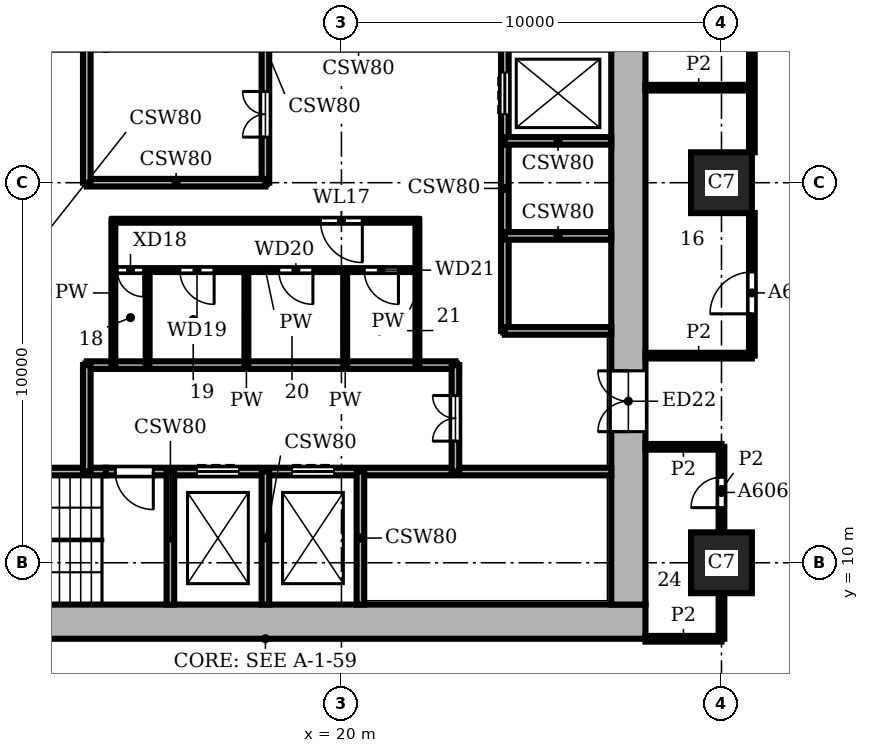
"""IFC4 building model, lengths in metres.
Left out: names, types, materials, properties, quantities, classifications, styles, units other than length and angle.
Written with IfcOpenShell. Run it as: python <this file> out.ifc"""

import sys

from ifc_helpers import new_model, si_unit, direction, frame, frame_2d, origin, origin_2d, place, context, subcontext, project, spatial, rectangle, extrude, element, fill, save


model = new_model("IFC4")
c1 = context("Model", 3, precision=1e-05, world=origin(), true_north=direction((0.0, 1.0)))
c2 = subcontext(c1, "Body", "Model", "MODEL_VIEW")
j1 = project(units=[si_unit("LENGTHUNIT", "METRE"), si_unit("PLANEANGLEUNIT", "RADIAN")], contexts=[c1])
p1 = place(None, origin())
s1 = spatial("IfcSite", under=j1, at=p1, CompositionType="ELEMENT")
p2 = place(p1, origin())
s2 = spatial("IfcBuilding", under=s1, at=p2, CompositionType="ELEMENT")
p3 = place(p2, frame((0.0, 0.0, 70.5)))
s3 = spatial("IfcBuildingStorey", under=s2, at=p3, CompositionType="ELEMENT", Elevation=70.5)
for number, where, z_axis, x_axis in (
    (1, (30.0, 10.0, 0.0), (0.0, 0.0, 1.0), (1.0, 0.0, 0.0)),
    (2, (30.0, 20.0, 0.0), (0.0, 0.0, 1.0), (1.0, 0.0, 0.0)),
):
    element("IfcColumn", number, at=place(p3, frame(where, z_axis=z_axis, x_axis=x_axis)), inside=s3, PredefinedType="COLUMN", context=c2, shape_type="SweptSolid", body=[
        extrude(rectangle(XDim=1.6, YDim=1.6, at=origin_2d()), origin(), (0.0, 0.0, 1.0), 3.9),
    ])
p4 = place(p3, frame((8.0, 8.45, 0.0), z_axis=(0.0, 0.0, 1.0), x_axis=(1.0, 0.0, 0.0)))
e3 = element("IfcWall", 3, at=p4, inside=s3, PredefinedType="SHEAR", context=c2, shape_type="SweptSolid", body=[
    extrude(rectangle(XDim=20.0, YDim=0.9, at=frame_2d((10.0, 0.0))), origin(), (0.0, 0.0, 1.0), 3.9),
])
p5 = place(p3, frame((27.55, 8.9, 0.0), z_axis=(0.0, 0.0, 1.0), x_axis=(0.0, 1.0, 0.0)))
e4 = element("IfcWall", 4, at=p5, inside=s3, PredefinedType="SHEAR", context=c2, shape_type="SweptSolid", body=[
    extrude(rectangle(XDim=18.2, YDim=0.9, at=frame_2d((9.1, 0.0))), origin(), (0.0, 0.0, 1.0), 3.9),
])
p6 = place(p5, frame((4.55, 0.0, 0.0)))
e5 = element("IfcOpeningElement", 5, at=p6, cuts=e4, PredefinedType="OPENING", context=c2, shape_type="SweptSolid", body=[
    extrude(rectangle(XDim=1.6, YDim=2.1, at=frame_2d((0.8, 1.05))), frame((0.0, 0.46, 0.0), z_axis=(0.0, -1.0, 0.0), x_axis=(1.0, 0.0, 0.0)), (0.0, 0.0, 1.0), 0.92),
])
p7 = place(p3, frame((8.9, 12.4, 0.0), z_axis=(0.0, 0.0, 1.0), x_axis=(1.0, 0.0, 0.0)))
e6 = element("IfcWall", 6, at=p7, inside=s3, PredefinedType="SHEAR", context=c2, shape_type="SweptSolid", body=[
    extrude(rectangle(XDim=4.9, YDim=0.2, at=frame_2d((2.45, 0.0))), origin(), (0.0, 0.0, 1.0), 3.58),
])
p8 = place(p3, frame((13.8, 12.4, 0.0), z_axis=(0.0, 0.0, 1.0), x_axis=(1.0, 0.0, 0.0)))
e7 = element("IfcWall", 7, at=p8, inside=s3, PredefinedType="SHEAR", context=c2, shape_type="SweptSolid", body=[
    extrude(rectangle(XDim=13.3, YDim=0.2, at=frame_2d((6.65, 0.0))), origin(), (0.0, 0.0, 1.0), 3.58),
])
p9 = place(p8, frame((2.4, 0.0, 0.0)))
e8 = element("IfcOpeningElement", 8, at=p9, cuts=e7, PredefinedType="OPENING", context=c2, shape_type="SweptSolid", body=[
    extrude(rectangle(XDim=1.1, YDim=2.1, at=frame_2d((0.55, 1.05))), frame((0.0, 0.11, 0.0), z_axis=(0.0, -1.0, 0.0), x_axis=(1.0, 0.0, 0.0)), (0.0, 0.0, 1.0), 0.22),
])
p10 = place(p8, frame((4.9, 0.0, 0.0)))
e9 = element("IfcOpeningElement", 9, at=p10, cuts=e7, PredefinedType="OPENING", context=c2, shape_type="SweptSolid", body=[
    extrude(rectangle(XDim=1.1, YDim=2.1, at=frame_2d((0.55, 1.05))), frame((0.0, 0.11, 0.0), z_axis=(0.0, -1.0, 0.0), x_axis=(1.0, 0.0, 0.0)), (0.0, 0.0, 1.0), 0.22),
])
p11 = place(p8, frame((0.25, 0.0, 0.0)))
e10 = element("IfcOpeningElement", 10, at=p11, cuts=e7, PredefinedType="OPENING", context=c2, shape_type="SweptSolid", body=[
    extrude(rectangle(XDim=1.0, YDim=2.1, at=frame_2d((0.5, 1.05))), frame((0.0, 0.11, 0.0), z_axis=(0.0, -1.0, 0.0), x_axis=(1.0, 0.0, 0.0)), (0.0, 0.0, 1.0), 0.22),
])
p12 = place(p3, frame((13.3, 15.2, 0.0), z_axis=(0.0, 0.0, 1.0), x_axis=(1.0, 0.0, 0.0)))
e11 = element("IfcWall", 11, at=p12, inside=s3, PredefinedType="SHEAR", context=c2, shape_type="SweptSolid", body=[
    extrude(rectangle(XDim=9.7, YDim=0.2, at=frame_2d((4.85, 0.0))), origin(), (0.0, 0.0, 1.0), 3.58),
])
p13 = place(p3, frame((24.3, 16.1, 0.0), z_axis=(0.0, 0.0, 1.0), x_axis=(1.0, 0.0, 0.0)))
e12 = element("IfcWall", 12, at=p13, inside=s3, PredefinedType="SHEAR", context=c2, shape_type="SweptSolid", body=[
    extrude(rectangle(XDim=2.8, YDim=0.2, at=frame_2d((1.4, 0.0))), origin(), (0.0, 0.0, 1.0), 3.58),
])
p14 = place(p3, frame((14.0, 17.7, 0.0), z_axis=(0.0, 0.0, 1.0), x_axis=(1.0, 0.0, 0.0)))
e13 = element("IfcWall", 13, at=p14, inside=s3, PredefinedType="PARTITIONING", context=c2, shape_type="SweptSolid", body=[
    extrude(rectangle(XDim=8.0, YDim=0.1, at=frame_2d((4.0, 0.0))), origin(), (0.0, 0.0, 1.0), 3.58),
])
p15 = place(p14, frame((0.1, 0.0, 0.0)))
e14 = element("IfcOpeningElement", 14, at=p15, cuts=e13, PredefinedType="OPENING", context=c2, shape_type="SweptSolid", body=[
    extrude(rectangle(XDim=0.7, YDim=2.1, at=frame_2d((0.35, 1.05))), frame((0.0, 0.06, 0.0), z_axis=(0.0, -1.0, 0.0), x_axis=(1.0, 0.0, 0.0)), (0.0, 0.0, 1.0), 0.12),
])
p16 = place(p14, frame((1.75, 0.0, 0.0)))
e15 = element("IfcOpeningElement", 15, at=p16, cuts=e13, PredefinedType="OPENING", context=c2, shape_type="SweptSolid", body=[
    extrude(rectangle(XDim=0.9, YDim=2.1, at=frame_2d((0.45, 1.05))), frame((0.0, 0.06, 0.0), z_axis=(0.0, -1.0, 0.0), x_axis=(1.0, 0.0, 0.0)), (0.0, 0.0, 1.0), 0.12),
])
p17 = place(p14, frame((4.35, 0.0, 0.0)))
e16 = element("IfcOpeningElement", 16, at=p17, cuts=e13, PredefinedType="OPENING", context=c2, shape_type="SweptSolid", body=[
    extrude(rectangle(XDim=0.9, YDim=2.1, at=frame_2d((0.45, 1.05))), frame((0.0, 0.06, 0.0), z_axis=(0.0, -1.0, 0.0), x_axis=(1.0, 0.0, 0.0)), (0.0, 0.0, 1.0), 0.12),
])
p18 = place(p14, frame((6.6, 0.0, 0.0)))
e17 = element("IfcOpeningElement", 17, at=p18, cuts=e13, PredefinedType="OPENING", context=c2, shape_type="SweptSolid", body=[
    extrude(rectangle(XDim=0.9, YDim=2.1, at=frame_2d((0.45, 1.05))), frame((0.0, 0.06, 0.0), z_axis=(0.0, -1.0, 0.0), x_axis=(1.0, 0.0, 0.0)), (0.0, 0.0, 1.0), 0.12),
])
p19 = place(p3, frame((24.3, 18.6, 0.0), z_axis=(0.0, 0.0, 1.0), x_axis=(1.0, 0.0, 0.0)))
e18 = element("IfcWall", 18, at=p19, inside=s3, PredefinedType="SHEAR", context=c2, shape_type="SweptSolid", body=[
    extrude(rectangle(XDim=2.8, YDim=0.2, at=frame_2d((1.4, 0.0))), origin(), (0.0, 0.0, 1.0), 3.58),
])
p20 = place(p3, frame((14.0, 19.0, 0.0), z_axis=(0.0, 0.0, 1.0), x_axis=(1.0, 0.0, 0.0)))
e19 = element("IfcWall", 19, at=p20, inside=s3, PredefinedType="PARTITIONING", context=c2, shape_type="SweptSolid", body=[
    extrude(rectangle(XDim=8.0, YDim=0.1, at=frame_2d((4.0, 0.0))), origin(), (0.0, 0.0, 1.0), 3.58),
])
p21 = place(p20, frame((5.45, 0.0, 0.0)))
e20 = element("IfcOpeningElement", 20, at=p21, cuts=e19, PredefinedType="OPENING", context=c2, shape_type="SweptSolid", body=[
    extrude(rectangle(XDim=1.1, YDim=2.1, at=frame_2d((0.55, 1.05))), frame((0.0, 0.06, 0.0), z_axis=(0.0, -1.0, 0.0), x_axis=(1.0, 0.0, 0.0)), (0.0, 0.0, 1.0), 0.12),
])
p22 = place(p3, frame((13.3, 20.0, 0.0), z_axis=(0.0, 0.0, 1.0), x_axis=(1.0, 0.0, 0.0)))
e21 = element("IfcWall", 21, at=p22, inside=s3, PredefinedType="SHEAR", context=c2, shape_type="SweptSolid", body=[
    extrude(rectangle(XDim=4.7, YDim=0.2, at=frame_2d((2.35, 0.0))), origin(), (0.0, 0.0, 1.0), 3.58),
])
for number, where, z_axis, x_axis in (
    (22, (24.3, 21.1, 0.0), (0.0, 0.0, 1.0), (1.0, 0.0, 0.0)),
    (23, (13.3, 12.4, 0.0), (0.0, 0.0, 1.0), (0.0, 1.0, 0.0)),
):
    element("IfcWall", number, at=place(p3, frame(where, z_axis=z_axis, x_axis=x_axis)), inside=s3, PredefinedType="SHEAR", context=c2, shape_type="SweptSolid", body=[
        extrude(rectangle(XDim=2.8, YDim=0.2, at=frame_2d((1.4, 0.0))), origin(), (0.0, 0.0, 1.0), 3.58),
    ])
p23 = place(p3, frame((13.3, 20.0, 0.0), z_axis=(0.0, 0.0, 1.0), x_axis=(0.0, 1.0, 0.0)))
e24 = element("IfcWall", 24, at=p23, inside=s3, PredefinedType="SHEAR", context=c2, shape_type="SweptSolid", body=[
    extrude(rectangle(XDim=3.6, YDim=0.2, at=frame_2d((1.8, 0.0))), origin(), (0.0, 0.0, 1.0), 3.58),
])
p24 = place(p3, frame((14.0, 15.2, 0.0), z_axis=(0.0, 0.0, 1.0), x_axis=(0.0, 1.0, 0.0)))
e25 = element("IfcWall", 25, at=p24, inside=s3, PredefinedType="PARTITIONING", context=c2, shape_type="SweptSolid", body=[
    extrude(rectangle(XDim=3.8, YDim=0.1, at=frame_2d((1.9, 0.0))), origin(), (0.0, 0.0, 1.0), 3.58),
])
p25 = place(p3, frame((14.9, 15.2, 0.0), z_axis=(0.0, 0.0, 1.0), x_axis=(0.0, 1.0, 0.0)))
e26 = element("IfcWall", 26, at=p25, inside=s3, PredefinedType="PARTITIONING", context=c2, shape_type="SweptSolid", body=[
    extrude(rectangle(XDim=2.5, YDim=0.1, at=frame_2d((1.25, 0.0))), origin(), (0.0, 0.0, 1.0), 3.58),
])
p26 = place(p3, frame((15.5, 8.9, 0.0), z_axis=(0.0, 0.0, 1.0), x_axis=(0.0, 1.0, 0.0)))
e27 = element("IfcWall", 27, at=p26, inside=s3, PredefinedType="SHEAR", context=c2, shape_type="SweptSolid", body=[
    extrude(rectangle(XDim=3.5, YDim=0.2, at=frame_2d((1.75, 0.0))), origin(), (0.0, 0.0, 1.0), 3.58),
])
p27 = place(p3, frame((17.5, 15.2, 0.0), z_axis=(0.0, 0.0, 1.0), x_axis=(0.0, 1.0, 0.0)))
e28 = element("IfcWall", 28, at=p27, inside=s3, PredefinedType="PARTITIONING", context=c2, shape_type="SweptSolid", body=[
    extrude(rectangle(XDim=2.5, YDim=0.1, at=frame_2d((1.25, 0.0))), origin(), (0.0, 0.0, 1.0), 3.58),
])
p28 = place(p3, frame((18.0, 8.9, 0.0), z_axis=(0.0, 0.0, 1.0), x_axis=(0.0, 1.0, 0.0)))
e29 = element("IfcWall", 29, at=p28, inside=s3, PredefinedType="SHEAR", context=c2, shape_type="SweptSolid", body=[
    extrude(rectangle(XDim=3.5, YDim=0.2, at=frame_2d((1.75, 0.0))), origin(), (0.0, 0.0, 1.0), 3.58),
])
p29 = place(p3, frame((18.0, 20.0, 0.0), z_axis=(0.0, 0.0, 1.0), x_axis=(0.0, 1.0, 0.0)))
e30 = element("IfcWall", 30, at=p29, inside=s3, PredefinedType="SHEAR", context=c2, shape_type="SweptSolid", body=[
    extrude(rectangle(XDim=7.1, YDim=0.2, at=frame_2d((3.55, 0.0))), origin(), (0.0, 0.0, 1.0), 3.58),
])
p30 = place(p29, frame((1.2, 0.0, 0.0)))
e31 = element("IfcOpeningElement", 31, at=p30, cuts=e30, PredefinedType="OPENING", context=c2, shape_type="SweptSolid", body=[
    extrude(rectangle(XDim=1.2, YDim=2.1, at=frame_2d((0.6, 1.05))), frame((0.0, 0.11, 0.0), z_axis=(0.0, -1.0, 0.0), x_axis=(1.0, 0.0, 0.0)), (0.0, 0.0, 1.0), 0.22),
])
p31 = place(p3, frame((20.1, 15.2, 0.0), z_axis=(0.0, 0.0, 1.0), x_axis=(0.0, 1.0, 0.0)))
e32 = element("IfcWall", 32, at=p31, inside=s3, PredefinedType="PARTITIONING", context=c2, shape_type="SweptSolid", body=[
    extrude(rectangle(XDim=2.5, YDim=0.1, at=frame_2d((1.25, 0.0))), origin(), (0.0, 0.0, 1.0), 3.58),
])
p32 = place(p3, frame((20.5, 8.9, 0.0), z_axis=(0.0, 0.0, 1.0), x_axis=(0.0, 1.0, 0.0)))
e33 = element("IfcWall", 33, at=p32, inside=s3, PredefinedType="SHEAR", context=c2, shape_type="SweptSolid", body=[
    extrude(rectangle(XDim=3.5, YDim=0.2, at=frame_2d((1.75, 0.0))), origin(), (0.0, 0.0, 1.0), 3.58),
])
p33 = place(p3, frame((22.0, 15.2, 0.0), z_axis=(0.0, 0.0, 1.0), x_axis=(0.0, 1.0, 0.0)))
e34 = element("IfcWall", 34, at=p33, inside=s3, PredefinedType="PARTITIONING", context=c2, shape_type="SweptSolid", body=[
    extrude(rectangle(XDim=3.8, YDim=0.1, at=frame_2d((1.9, 0.0))), origin(), (0.0, 0.0, 1.0), 3.58),
])
p34 = place(p3, frame((23.0, 12.4, 0.0), z_axis=(0.0, 0.0, 1.0), x_axis=(0.0, 1.0, 0.0)))
e35 = element("IfcWall", 35, at=p34, inside=s3, PredefinedType="SHEAR", context=c2, shape_type="SweptSolid", body=[
    extrude(rectangle(XDim=2.8, YDim=0.2, at=frame_2d((1.4, 0.0))), origin(), (0.0, 0.0, 1.0), 3.58),
])
p35 = place(p34, frame((0.8, 0.0, 0.0)))
e36 = element("IfcOpeningElement", 36, at=p35, cuts=e35, PredefinedType="OPENING", context=c2, shape_type="SweptSolid", body=[
    extrude(rectangle(XDim=1.2, YDim=2.1, at=frame_2d((0.6, 1.05))), frame((0.0, 0.11, 0.0), z_axis=(0.0, -1.0, 0.0), x_axis=(1.0, 0.0, 0.0)), (0.0, 0.0, 1.0), 0.22),
])
p36 = place(p3, frame((24.3, 16.1, 0.0), z_axis=(0.0, 0.0, 1.0), x_axis=(0.0, 1.0, 0.0)))
e37 = element("IfcWall", 37, at=p36, inside=s3, PredefinedType="SHEAR", context=c2, shape_type="SweptSolid", body=[
    extrude(rectangle(XDim=7.5, YDim=0.2, at=frame_2d((3.75, 0.0))), origin(), (0.0, 0.0, 1.0), 3.58),
])
p37 = place(p36, frame((5.7, 0.0, 0.0)))
e38 = element("IfcOpeningElement", 38, at=p37, cuts=e37, PredefinedType="OPENING", context=c2, shape_type="SweptSolid", body=[
    extrude(rectangle(XDim=1.1, YDim=2.1, at=frame_2d((0.55, 1.05))), frame((0.0, 0.11, 0.0), z_axis=(0.0, -1.0, 0.0), x_axis=(1.0, 0.0, 0.0)), (0.0, 0.0, 1.0), 0.22),
])
p38 = place(p3, frame((30.0, 8.0, 0.0), z_axis=(0.0, 0.0, 1.0), x_axis=(0.0, 1.0, 0.0)))
e39 = element("IfcWall", 39, at=p38, inside=s3, PredefinedType="PARTITIONING", context=c2, shape_type="SweptSolid", body=[
    extrude(rectangle(XDim=1.2, YDim=0.15, at=frame_2d((0.6, 0.0))), origin(), (0.0, 0.0, 1.0), 3.58),
])
p39 = place(p3, frame((30.0, 10.8, 0.0), z_axis=(0.0, 0.0, 1.0), x_axis=(0.0, 1.0, 0.0)))
e40 = element("IfcWall", 40, at=p39, inside=s3, PredefinedType="PARTITIONING", context=c2, shape_type="SweptSolid", body=[
    extrude(rectangle(XDim=2.25, YDim=0.15, at=frame_2d((1.125, 0.0))), origin(), (0.0, 0.0, 1.0), 3.58),
])
p40 = place(p39, frame((0.65, 0.0, 0.0)))
e41 = element("IfcOpeningElement", 41, at=p40, cuts=e40, PredefinedType="OPENING", context=c2, shape_type="SweptSolid", body=[
    extrude(rectangle(XDim=0.8, YDim=2.1, at=frame_2d((0.4, 1.05))), frame((0.0, 0.085, 0.0), z_axis=(0.0, -1.0, 0.0), x_axis=(1.0, 0.0, 0.0)), (0.0, 0.0, 1.0), 0.17),
])
p41 = place(p3, frame((30.8, 15.45, 0.0), z_axis=(0.0, 0.0, 1.0), x_axis=(0.0, 1.0, 0.0)))
e42 = element("IfcWall", 42, at=p41, inside=s3, PredefinedType="PARTITIONING", context=c2, shape_type="SweptSolid", body=[
    extrude(rectangle(XDim=3.75, YDim=0.15, at=frame_2d((1.875, 0.0))), origin(), (0.0, 0.0, 1.0), 3.58),
])
p42 = place(p41, frame((1.1, 0.0, 0.0)))
e43 = element("IfcOpeningElement", 43, at=p42, cuts=e42, PredefinedType="OPENING", context=c2, shape_type="SweptSolid", body=[
    extrude(rectangle(XDim=1.1, YDim=2.1, at=frame_2d((0.55, 1.05))), frame((0.0, 0.085, 0.0), z_axis=(0.0, -1.0, 0.0), x_axis=(1.0, 0.0, 0.0)), (0.0, 0.0, 1.0), 0.17),
])
p43 = place(p3, frame((30.8, 20.8, 0.0), z_axis=(0.0, 0.0, 1.0), x_axis=(0.0, 1.0, 0.0)))
e44 = element("IfcWall", 44, at=p43, inside=s3, PredefinedType="PARTITIONING", context=c2, shape_type="SweptSolid", body=[
    extrude(rectangle(XDim=8.4, YDim=0.15, at=frame_2d((4.2, 0.0))), origin(), (0.0, 0.0, 1.0), 3.58),
])
p44 = place(p43, frame((4.3, 0.0, 0.0)))
e45 = element("IfcOpeningElement", 45, at=p44, cuts=e44, PredefinedType="OPENING", context=c2, shape_type="SweptSolid", body=[
    extrude(rectangle(XDim=0.8, YDim=2.1, at=frame_2d((0.4, 1.05))), frame((0.0, 0.085, 0.0), z_axis=(0.0, -1.0, 0.0), x_axis=(1.0, 0.0, 0.0)), (0.0, 0.0, 1.0), 0.17),
])
for number, where, z_axis, x_axis in (
    (46, (28.0, 8.0, 0.0), (0.0, 0.0, 1.0), (1.0, 0.0, 0.0)),
    (47, (28.0, 13.05, 0.0), (0.0, 0.0, 1.0), (1.0, 0.0, 0.0)),
):
    element("IfcWall", number, at=place(p3, frame(where, z_axis=z_axis, x_axis=x_axis)), inside=s3, PredefinedType="PARTITIONING", context=c2, shape_type="SweptSolid", body=[
        extrude(rectangle(XDim=2.0, YDim=0.15, at=frame_2d((1.0, 0.0))), origin(), (0.0, 0.0, 1.0), 3.58),
    ])
for number, where, z_axis, x_axis in (
    (48, (28.0, 15.45, 0.0), (0.0, 0.0, 1.0), (1.0, 0.0, 0.0)),
    (49, (28.0, 22.5, 0.0), (0.0, 0.0, 1.0), (1.0, 0.0, 0.0)),
):
    element("IfcWall", number, at=place(p3, frame(where, z_axis=z_axis, x_axis=x_axis)), inside=s3, PredefinedType="PARTITIONING", context=c2, shape_type="SweptSolid", body=[
        extrude(rectangle(XDim=2.8, YDim=0.15, at=frame_2d((1.4, 0.0))), origin(), (0.0, 0.0, 1.0), 3.58),
    ])
p45 = place(p37, origin())
e50 = element("IfcDoor", 50, at=p45, inside=s3, OperationType="DOUBLE_DOOR_SLIDING", PredefinedType="DOOR", context=c2, shape_type="SweptSolid", body=[
    extrude(rectangle(XDim=1.1, YDim=2.1, at=frame_2d((0.55, 1.05))), frame((0.0, 0.025, 0.0), z_axis=(0.0, -1.0, 0.0), x_axis=(1.0, 0.0, 0.0)), (0.0, 0.0, 1.0), 0.05),
])
fill(e38, e50)
p46 = place(p9, origin())
e51 = element("IfcDoor", 51, at=p46, inside=s3, OperationType="DOUBLE_DOOR_SLIDING", PredefinedType="DOOR", context=c2, shape_type="SweptSolid", body=[
    extrude(rectangle(XDim=1.1, YDim=2.1, at=frame_2d((0.55, 1.05))), frame((0.0, 0.025, 0.0), z_axis=(0.0, -1.0, 0.0), x_axis=(1.0, 0.0, 0.0)), (0.0, 0.0, 1.0), 0.05),
])
fill(e8, e51)
p47 = place(p10, origin())
e52 = element("IfcDoor", 52, at=p47, inside=s3, OperationType="DOUBLE_DOOR_SLIDING", PredefinedType="DOOR", context=c2, shape_type="SweptSolid", body=[
    extrude(rectangle(XDim=1.1, YDim=2.1, at=frame_2d((0.55, 1.05))), frame((0.0, 0.025, 0.0), z_axis=(0.0, -1.0, 0.0), x_axis=(1.0, 0.0, 0.0)), (0.0, 0.0, 1.0), 0.05),
])
fill(e9, e52)
p48 = place(p11, frame((1.0, 0.0, 0.0), z_axis=(0.0, 0.0, 1.0), x_axis=(-1.0, 0.0, 0.0)))
e53 = element("IfcDoor", 53, at=p48, inside=s3, OperationType="SINGLE_SWING_LEFT", PredefinedType="DOOR", context=c2, shape_type="SweptSolid", body=[
    extrude(rectangle(XDim=1.0, YDim=2.1, at=frame_2d((0.5, 1.05))), frame((0.0, 0.025, 0.0), z_axis=(0.0, -1.0, 0.0), x_axis=(1.0, 0.0, 0.0)), (0.0, 0.0, 1.0), 0.05),
])
fill(e10, e53)
p49 = place(p35, origin())
e54 = element("IfcDoor", 54, at=p49, inside=s3, OperationType="DOUBLE_DOOR_SINGLE_SWING", PredefinedType="DOOR", context=c2, shape_type="SweptSolid", body=[
    extrude(rectangle(XDim=1.2, YDim=2.1, at=frame_2d((0.6, 1.05))), frame((0.0, 0.025, 0.0), z_axis=(0.0, -1.0, 0.0), x_axis=(1.0, 0.0, 0.0)), (0.0, 0.0, 1.0), 0.05),
])
fill(e36, e54)
p50 = place(p30, origin())
e55 = element("IfcDoor", 55, at=p50, inside=s3, OperationType="DOUBLE_DOOR_SINGLE_SWING", PredefinedType="DOOR", context=c2, shape_type="SweptSolid", body=[
    extrude(rectangle(XDim=1.2, YDim=2.1, at=frame_2d((0.6, 1.05))), frame((0.0, 0.025, 0.0), z_axis=(0.0, -1.0, 0.0), x_axis=(1.0, 0.0, 0.0)), (0.0, 0.0, 1.0), 0.05),
])
fill(e31, e55)
p51 = place(p21, frame((1.1, 0.0, 0.0), z_axis=(0.0, 0.0, 1.0), x_axis=(-1.0, 0.0, 0.0)))
e56 = element("IfcDoor", 56, at=p51, inside=s3, OperationType="SINGLE_SWING_LEFT", PredefinedType="DOOR", context=c2, shape_type="SweptSolid", body=[
    extrude(rectangle(XDim=1.1, YDim=2.1, at=frame_2d((0.55, 1.05))), frame((0.0, 0.025, 0.0), z_axis=(0.0, -1.0, 0.0), x_axis=(1.0, 0.0, 0.0)), (0.0, 0.0, 1.0), 0.05),
])
fill(e20, e56)
p52 = place(p15, frame((0.7, 0.0, 0.0), z_axis=(0.0, 0.0, 1.0), x_axis=(-1.0, 0.0, 0.0)))
e57 = element("IfcDoor", 57, at=p52, inside=s3, OperationType="SINGLE_SWING_LEFT", PredefinedType="DOOR", context=c2, shape_type="SweptSolid", body=[
    extrude(rectangle(XDim=0.7, YDim=2.1, at=frame_2d((0.35, 1.05))), frame((0.0, 0.025, 0.0), z_axis=(0.0, -1.0, 0.0), x_axis=(1.0, 0.0, 0.0)), (0.0, 0.0, 1.0), 0.05),
])
fill(e14, e57)
p53 = place(p16, frame((0.9, 0.0, 0.0), z_axis=(0.0, 0.0, 1.0), x_axis=(-1.0, 0.0, 0.0)))
e58 = element("IfcDoor", 58, at=p53, inside=s3, OperationType="SINGLE_SWING_LEFT", PredefinedType="DOOR", context=c2, shape_type="SweptSolid", body=[
    extrude(rectangle(XDim=0.9, YDim=2.1, at=frame_2d((0.45, 1.05))), frame((0.0, 0.025, 0.0), z_axis=(0.0, -1.0, 0.0), x_axis=(1.0, 0.0, 0.0)), (0.0, 0.0, 1.0), 0.05),
])
fill(e15, e58)
p54 = place(p17, frame((0.9, 0.0, 0.0), z_axis=(0.0, 0.0, 1.0), x_axis=(-1.0, 0.0, 0.0)))
e59 = element("IfcDoor", 59, at=p54, inside=s3, OperationType="SINGLE_SWING_LEFT", PredefinedType="DOOR", context=c2, shape_type="SweptSolid", body=[
    extrude(rectangle(XDim=0.9, YDim=2.1, at=frame_2d((0.45, 1.05))), frame((0.0, 0.025, 0.0), z_axis=(0.0, -1.0, 0.0), x_axis=(1.0, 0.0, 0.0)), (0.0, 0.0, 1.0), 0.05),
])
fill(e16, e59)
p55 = place(p18, frame((0.9, 0.0, 0.0), z_axis=(0.0, 0.0, 1.0), x_axis=(-1.0, 0.0, 0.0)))
e60 = element("IfcDoor", 60, at=p55, inside=s3, OperationType="SINGLE_SWING_LEFT", PredefinedType="DOOR", context=c2, shape_type="SweptSolid", body=[
    extrude(rectangle(XDim=0.9, YDim=2.1, at=frame_2d((0.45, 1.05))), frame((0.0, 0.025, 0.0), z_axis=(0.0, -1.0, 0.0), x_axis=(1.0, 0.0, 0.0)), (0.0, 0.0, 1.0), 0.05),
])
fill(e17, e60)
p56 = place(p6, origin())
e61 = element("IfcDoor", 61, at=p56, inside=s3, OperationType="DOUBLE_DOOR_SINGLE_SWING", PredefinedType="DOOR", context=c2, shape_type="SweptSolid", body=[
    extrude(rectangle(XDim=1.6, YDim=2.1, at=frame_2d((0.8, 1.05))), frame((0.0, 0.025, 0.0), z_axis=(0.0, -1.0, 0.0), x_axis=(1.0, 0.0, 0.0)), (0.0, 0.0, 1.0), 0.05),
])
fill(e5, e61)
p57 = place(p40, origin())
e62 = element("IfcDoor", 62, at=p57, inside=s3, OperationType="SINGLE_SWING_LEFT", PredefinedType="DOOR", context=c2, shape_type="SweptSolid", body=[
    extrude(rectangle(XDim=0.8, YDim=2.1, at=frame_2d((0.4, 1.05))), frame((0.0, 0.025, 0.0), z_axis=(0.0, -1.0, 0.0), x_axis=(1.0, 0.0, 0.0)), (0.0, 0.0, 1.0), 0.05),
])
fill(e41, e62)
p58 = place(p42, origin())
e63 = element("IfcDoor", 63, at=p58, inside=s3, OperationType="SINGLE_SWING_LEFT", PredefinedType="DOOR", context=c2, shape_type="SweptSolid", body=[
    extrude(rectangle(XDim=1.1, YDim=2.1, at=frame_2d((0.55, 1.05))), frame((0.0, 0.025, 0.0), z_axis=(0.0, -1.0, 0.0), x_axis=(1.0, 0.0, 0.0)), (0.0, 0.0, 1.0), 0.05),
])
fill(e43, e63)
save(model, sys.argv[1])
